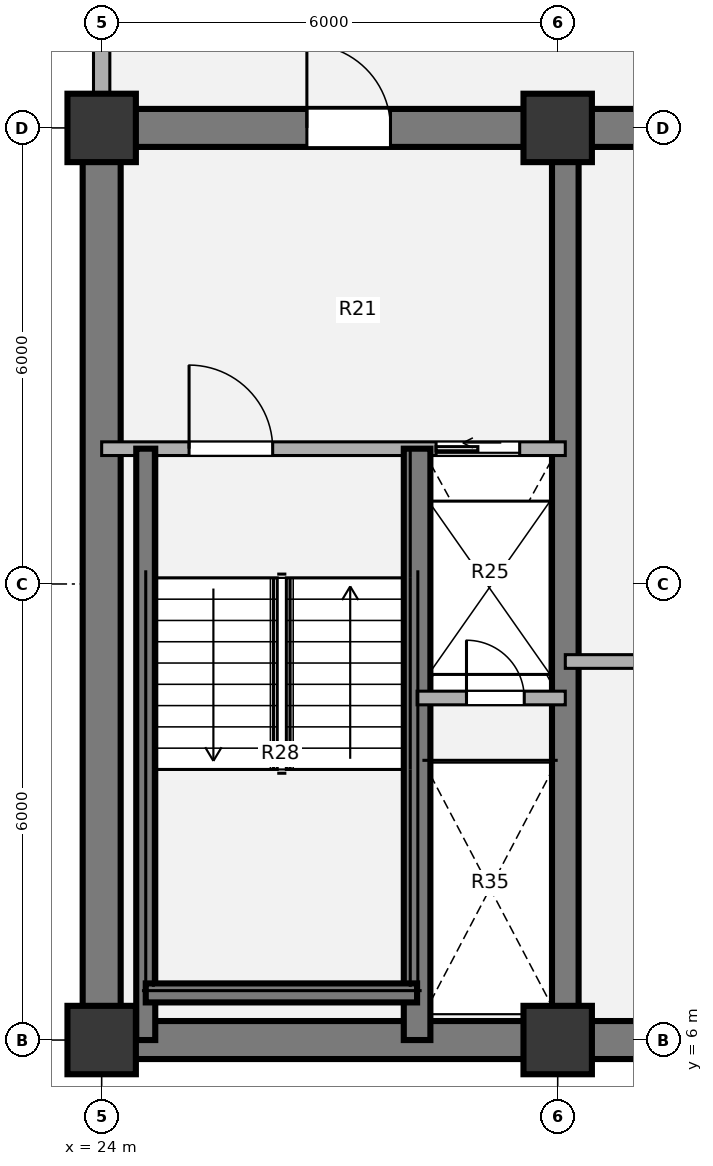
"""IFC4 building model, lengths in metres.
Left out: names, types, materials, properties, quantities, classifications, styles, units other than length and angle.
Written with IfcOpenShell. Run it as: python <this file> out.ifc"""

import sys

from ifc_helpers import new_model, si_unit, direction, frame, frame_2d, origin, origin_2d, place, context, subcontext, project, spatial, rectangle, extrude, source, transform, mapped, element, fill, save


model = new_model("IFC4")
c1 = context("Model", 3, precision=1e-05, world=origin(), true_north=direction((0.0, 1.0)))
c2 = subcontext(c1, "Body", "Model", "MODEL_VIEW")
j1 = project(units=[si_unit("LENGTHUNIT", "METRE"), si_unit("PLANEANGLEUNIT", "RADIAN")], contexts=[c1])
p1 = place(None, origin())
s1 = spatial("IfcSite", under=j1, at=p1, CompositionType="ELEMENT")
p2 = place(p1, origin())
s2 = spatial("IfcBuilding", under=s1, at=p2, CompositionType="ELEMENT")
p3 = place(p2, frame((0.0, 0.0, 101.16)))
s3 = spatial("IfcBuildingStorey", under=s2, at=p3, CompositionType="ELEMENT", Elevation=101.16)
m1 = source(origin(), c2, "Body", "SweptSolid", [
    extrude(rectangle(XDim=0.9, YDim=0.9, at=origin_2d()), origin(), (0.0, 0.0, 1.0), 3.78),
])
for number, where, z_axis, x_axis in (
    (1, (24.0, 6.0, 0.0), (0.0, 0.0, 1.0), (1.0, 0.0, 0.0)),
    (2, (30.0, 6.0, 0.0), (0.0, 0.0, 1.0), (1.0, 0.0, 0.0)),
    (3, (24.0, 18.0, 0.0), (0.0, 0.0, 1.0), (1.0, 0.0, 0.0)),
    (4, (30.0, 18.0, 0.0), (0.0, 0.0, 1.0), (1.0, 0.0, 0.0)),
):
    element("IfcColumn", number, at=place(p3, frame(where, z_axis=z_axis, x_axis=x_axis)), inside=s3, PredefinedType="COLUMN", context=c2, shape_type="MappedRepresentation", body=[
        mapped(m1, transform((0.0, 0.0, 0.0), x_axis=(1.0, 0.0, 0.0), y_axis=(0.0, 1.0, 0.0), z_axis=(0.0, 0.0, 1.0), scale=1.0)),
    ])
p4 = place(p3, frame((48.25, 6.0, 0.0), z_axis=(0.0, 0.0, 1.0), x_axis=(-1.0, 0.0, 0.0)))
e5 = element("IfcWall", 5, at=p4, inside=s3, PredefinedType="SHEAR", context=c2, shape_type="SweptSolid", body=[
    extrude(rectangle(XDim=24.5, YDim=0.5, at=frame_2d((12.25, 0.0))), origin(), (0.0, 0.0, 1.0), 3.78),
])
p5 = place(p3, frame((24.0, 6.0, 0.0), z_axis=(0.0, 0.0, 1.0), x_axis=(0.0, 1.0, 0.0)))
e6 = element("IfcWall", 6, at=p5, inside=s3, PredefinedType="SHEAR", context=c2, shape_type="SweptSolid", body=[
    extrude(rectangle(XDim=12.0, YDim=0.5, at=frame_2d((6.0, 0.0))), origin(), (0.0, 0.0, 1.0), 3.78),
])
p6 = place(p3, frame((23.75, 18.0, 0.0), z_axis=(0.0, 0.0, 1.0), x_axis=(1.0, 0.0, 0.0)))
e7 = element("IfcWall", 7, at=p6, inside=s3, PredefinedType="SHEAR", context=c2, shape_type="SweptSolid", body=[
    extrude(rectangle(XDim=9.45, YDim=0.5, at=frame_2d((4.725, 0.0))), origin(), (0.0, 0.0, 1.0), 3.78),
])
p7 = place(p6, frame((2.95, 0.0, 0.0)))
e8 = element("IfcOpeningElement", 8, at=p7, cuts=e7, PredefinedType="OPENING", context=c2, shape_type="SweptSolid", body=[
    extrude(rectangle(XDim=1.1, YDim=2.1, at=origin_2d()), frame((0.55, 0.26, 1.05), z_axis=(0.0, -1.0, 0.0), x_axis=(1.0, 0.0, 0.0)), (0.0, 0.0, 1.0), 0.52),
])
p8 = place(p3, frame((30.1, 6.0, 0.0), z_axis=(0.0, 0.0, 1.0), x_axis=(0.0, 1.0, 0.0)))
e9 = element("IfcWall", 9, at=p8, inside=s3, PredefinedType="SHEAR", context=c2, shape_type="SweptSolid", body=[
    extrude(rectangle(XDim=12.0, YDim=0.35, at=frame_2d((6.0, 0.0))), origin(), (0.0, 0.0, 1.0), 3.78),
])
p9 = place(p3, frame((24.0, 18.43, 0.0), z_axis=(0.0, 0.0, 1.0), x_axis=(0.0, 1.0, 0.0)))
e10 = element("IfcWall", 10, at=p9, inside=s3, PredefinedType="SOLIDWALL", context=c2, shape_type="SweptSolid", body=[
    extrude(rectangle(XDim=2.62, YDim=0.215, at=frame_2d((1.31, 0.0))), origin(), (0.0, 0.0, 1.0), 3.53),
])
p10 = place(p3, frame((30.1, 10.98, 0.0), z_axis=(0.0, 0.0, 1.0), x_axis=(1.0, 0.0, 0.0)))
e11 = element("IfcWall", 11, at=p10, inside=s3, PredefinedType="PARTITIONING", context=c2, shape_type="SweptSolid", body=[
    extrude(rectangle(XDim=4.08, YDim=0.18, at=frame_2d((2.04, 0.0))), origin(), (0.0, 0.0, 1.0), 3.5),
])
p11 = place(p3, frame((24.0, 13.78, 0.0), z_axis=(0.0, 0.0, 1.0), x_axis=(1.0, 0.0, 0.0)))
e12 = element("IfcWall", 12, at=p11, inside=s3, PredefinedType="PARTITIONING", context=c2, shape_type="SweptSolid", body=[
    extrude(rectangle(XDim=6.1, YDim=0.18, at=frame_2d((3.05, 0.0))), origin(), (0.0, 0.0, 1.0), 3.5),
])
p12 = place(p11, frame((1.15, 0.0, 0.0)))
e13 = element("IfcOpeningElement", 13, at=p12, cuts=e12, PredefinedType="OPENING", context=c2, shape_type="SweptSolid", body=[
    extrude(rectangle(XDim=1.1, YDim=2.1, at=origin_2d()), frame((0.55, 0.1, 1.05), z_axis=(0.0, -1.0, 0.0), x_axis=(1.0, 0.0, 0.0)), (0.0, 0.0, 1.0), 0.2),
])
p13 = place(p11, frame((4.4, 0.0, 0.0)))
e14 = element("IfcOpeningElement", 14, at=p13, cuts=e12, PredefinedType="OPENING", context=c2, shape_type="SweptSolid", body=[
    extrude(rectangle(XDim=1.1, YDim=2.1, at=origin_2d()), frame((0.55, 0.1, 1.05), z_axis=(0.0, -1.0, 0.0), x_axis=(1.0, 0.0, 0.0)), (0.0, 0.0, 1.0), 0.2),
])
p14 = place(p3, frame((28.15, 6.0, 0.0), z_axis=(0.0, 0.0, 1.0), x_axis=(0.0, 1.0, 0.0)))
e15 = element("IfcWall", 15, at=p14, inside=s3, PredefinedType="SHEAR", context=c2, shape_type="SweptSolid", body=[
    extrude(rectangle(XDim=7.78, YDim=0.35, at=frame_2d((3.89, 0.0))), origin(), (0.0, 0.0, 1.0), 3.85),
])
p15 = place(p3, frame((24.58, 6.0, 0.0), z_axis=(0.0, 0.0, 1.0), x_axis=(0.0, 1.0, 0.0)))
e16 = element("IfcWall", 16, at=p15, inside=s3, PredefinedType="SHEAR", context=c2, shape_type="SweptSolid", body=[
    extrude(rectangle(XDim=7.78, YDim=0.25, at=frame_2d((3.89, 0.0))), origin(), (0.0, 0.0, 1.0), 3.85),
])
p16 = place(p3, frame((24.58, 6.62, 0.0), z_axis=(0.0, 0.0, 1.0), x_axis=(1.0, 0.0, 0.0)))
e17 = element("IfcWall", 17, at=p16, inside=s3, PredefinedType="SHEAR", context=c2, shape_type="SweptSolid", body=[
    extrude(rectangle(XDim=3.57, YDim=0.25, at=frame_2d((1.785, 0.0))), origin(), (0.0, 0.0, 1.0), 3.85),
])
p17 = place(p3, frame((28.15, 10.5, 0.0), z_axis=(0.0, 0.0, 1.0), x_axis=(1.0, 0.0, 0.0)))
e18 = element("IfcWall", 18, at=p17, inside=s3, PredefinedType="PARTITIONING", context=c2, shape_type="SweptSolid", body=[
    extrude(rectangle(XDim=1.95, YDim=0.18, at=frame_2d((0.975, 0.0))), origin(), (0.0, 0.0, 1.0), 3.5),
])
p18 = place(p17, frame((0.65, 0.0, 0.0)))
e19 = element("IfcOpeningElement", 19, at=p18, cuts=e18, PredefinedType="OPENING", context=c2, shape_type="SweptSolid", body=[
    extrude(rectangle(XDim=0.76, YDim=2.05, at=origin_2d()), frame((0.38, 0.1, 1.025), z_axis=(0.0, -1.0, 0.0), x_axis=(1.0, 0.0, 0.0)), (0.0, 0.0, 1.0), 0.2),
])
m2 = source(origin(), c2, "Body", "SweptSolid", [
    extrude(rectangle(XDim=1.1, YDim=2.1, at=origin_2d()), frame((0.55, 0.025, 1.05), z_axis=(0.0, -1.0, 0.0), x_axis=(1.0, 0.0, 0.0)), (0.0, 0.0, 1.0), 0.05),
])
p19 = place(p12, origin())
e20 = element("IfcDoor", 20, at=p19, inside=s3, OperationType="SINGLE_SWING_LEFT", PredefinedType="DOOR", context=c2, shape_type="MappedRepresentation", body=[
    mapped(m2, transform((0.0, 0.0, 0.0), x_axis=(1.0, 0.0, 0.0), y_axis=(0.0, 1.0, 0.0), z_axis=(0.0, 0.0, 1.0), scale=1.0)),
])
fill(e13, e20)
m3 = source(origin(), c2, "Body", "SweptSolid", [
    extrude(rectangle(XDim=1.1, YDim=2.1, at=origin_2d()), frame((0.55, 0.025, 1.05), z_axis=(0.0, -1.0, 0.0), x_axis=(1.0, 0.0, 0.0)), (0.0, 0.0, 1.0), 0.05),
])
p20 = place(p13, origin())
e21 = element("IfcDoor", 21, at=p20, inside=s3, OperationType="SLIDING_TO_LEFT", PredefinedType="DOOR", context=c2, shape_type="MappedRepresentation", body=[
    mapped(m3, transform((0.0, 0.0, 0.0), x_axis=(1.0, 0.0, 0.0), y_axis=(0.0, 1.0, 0.0), z_axis=(0.0, 0.0, 1.0), scale=1.0)),
])
fill(e14, e21)
m4 = source(origin(), c2, "Body", "SweptSolid", [
    extrude(rectangle(XDim=0.76, YDim=2.05, at=origin_2d()), frame((0.38, 0.025, 1.025), z_axis=(0.0, -1.0, 0.0), x_axis=(1.0, 0.0, 0.0)), (0.0, 0.0, 1.0), 0.05),
])
p21 = place(p18, origin())
e22 = element("IfcDoor", 22, at=p21, inside=s3, OperationType="SINGLE_SWING_LEFT", PredefinedType="DOOR", context=c2, shape_type="MappedRepresentation", body=[
    mapped(m4, transform((0.0, 0.0, 0.0), x_axis=(1.0, 0.0, 0.0), y_axis=(0.0, 1.0, 0.0), z_axis=(0.0, 0.0, 1.0), scale=1.0)),
])
fill(e19, e22)
m5 = source(origin(), c2, "Body", "SweptSolid", [
    extrude(rectangle(XDim=1.1, YDim=2.1, at=origin_2d()), frame((0.55, 0.025, 1.05), z_axis=(0.0, -1.0, 0.0), x_axis=(1.0, 0.0, 0.0)), (0.0, 0.0, 1.0), 0.05),
])
p22 = place(p7, origin())
e23 = element("IfcDoor", 23, at=p22, inside=s3, OperationType="SINGLE_SWING_LEFT", PredefinedType="DOOR", context=c2, shape_type="MappedRepresentation", body=[
    mapped(m5, transform((0.0, 0.0, 0.0), x_axis=(1.0, 0.0, 0.0), y_axis=(0.0, 1.0, 0.0), z_axis=(0.0, 0.0, 1.0), scale=1.0)),
])
fill(e8, e23)
save(model, sys.argv[1])
